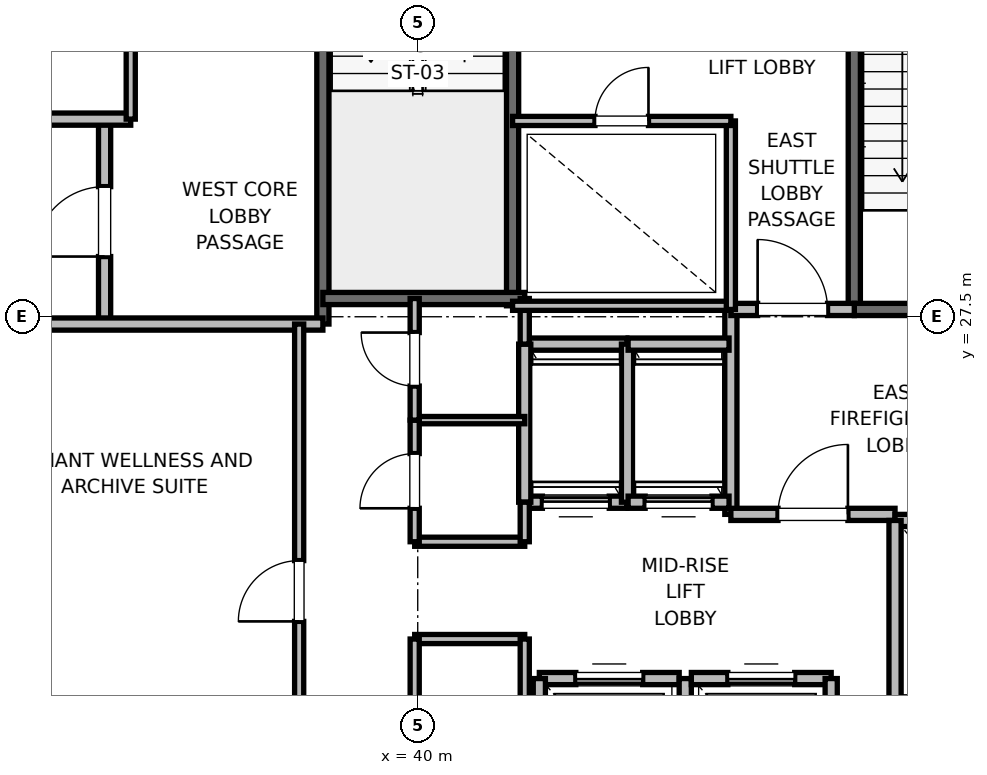
"""IFC4 building model, lengths in metres.
Left out: names, types, materials, properties, quantities, classifications, styles, units other than length and angle.
Written with IfcOpenShell. Run it as: python <this file> out.ifc"""

import sys

from ifc_helpers import new_model, si_unit, direction, frame, frame_2d, origin, place, context, subcontext, project, spatial, rectangle, extrude, element, fill, save


model = new_model("IFC4")
c1 = context("Model", 3, precision=1e-05, world=origin(), true_north=direction((0.0, 1.0)))
c2 = subcontext(c1, "Body", "Model", "MODEL_VIEW")
j1 = project(units=[si_unit("LENGTHUNIT", "METRE"), si_unit("PLANEANGLEUNIT", "RADIAN")], contexts=[c1])
p1 = place(None, origin())
s1 = spatial("IfcSite", under=j1, at=p1, CompositionType="ELEMENT")
p2 = place(p1, origin())
s2 = spatial("IfcBuilding", under=s1, at=p2, CompositionType="ELEMENT")
p3 = place(p2, frame((0.0, 0.0, 164.4)))
s3 = spatial("IfcBuildingStorey", under=s2, at=p3, CompositionType="ELEMENT", Elevation=164.4)
p4 = place(p3, frame((47.18, 27.62, 0.0), z_axis=(0.0, 0.0, 1.0), x_axis=(0.0, 1.0, 0.0)))
e1 = element("IfcWall", 1, at=p4, inside=s3, PredefinedType="SOLIDWALL", context=c2, shape_type="SweptSolid", body=[
    extrude(rectangle(XDim=8.18, YDim=0.2, at=frame_2d((4.09, 0.0))), origin(), (0.0, 0.0, 1.0), 3.775),
])
p5 = place(p3, frame((47.18, 27.62, 0.0), z_axis=(0.0, 0.0, 1.0), x_axis=(1.0, 0.0, 0.0)))
e2 = element("IfcWall", 2, at=p5, inside=s3, PredefinedType="SOLIDWALL", context=c2, shape_type="SweptSolid", body=[
    extrude(rectangle(XDim=3.12, YDim=0.2, at=frame_2d((1.56, 0.0))), origin(), (0.0, 0.0, 1.0), 3.775),
])
p6 = place(p5, frame((1.01, 0.0, 0.0)))
e3 = element("IfcOpeningElement", 3, at=p6, cuts=e2, PredefinedType="OPENING", context=c2, shape_type="SweptSolid", body=[
    extrude(rectangle(XDim=1.1, YDim=2.15, at=frame_2d((0.55, 1.075))), frame((0.0, 0.1, 0.0), z_axis=(0.0, -1.0, 0.0), x_axis=(1.0, 0.0, 0.0)), (0.0, 0.0, 1.0), 0.2),
])
p7 = place(p3, frame((38.44, 27.38, 0.0), z_axis=(0.0, 0.0, 1.0), x_axis=(0.0, 1.0, 0.0)))
e4 = element("IfcWall", 4, at=p7, inside=s3, PredefinedType="SOLIDWALL", context=c2, shape_type="SweptSolid", body=[
    extrude(rectangle(XDim=8.87, YDim=0.2, at=frame_2d((4.435, 0.0))), origin(), (0.0, 0.0, 1.0), 3.775),
])
p8 = place(p3, frame((41.56, 27.68, 0.0), z_axis=(0.0, 0.0, 1.0), x_axis=(0.0, 1.0, 0.0)))
e5 = element("IfcWall", 5, at=p8, inside=s3, PredefinedType="SOLIDWALL", context=c2, shape_type="SweptSolid", body=[
    extrude(rectangle(XDim=8.57, YDim=0.2, at=frame_2d((4.285, 0.0))), origin(), (0.0, 0.0, 1.0), 3.775),
])
p9 = place(p3, frame((38.44, 27.8, 0.0), z_axis=(0.0, 0.0, 1.0), x_axis=(1.0, 0.0, 0.0)))
e6 = element("IfcWall", 6, at=p9, inside=s3, PredefinedType="SOLIDWALL", context=c2, shape_type="SweptSolid", body=[
    extrude(rectangle(XDim=3.32, YDim=0.2, at=frame_2d((1.66, 0.0))), origin(), (0.0, 0.0, 1.0), 3.775),
])
p10 = place(p3, frame((34.85, 27.38, 0.0), z_axis=(0.0, 0.0, 1.0), x_axis=(0.0, 1.0, 0.0)))
e7 = element("IfcWall", 7, at=p10, inside=s3, PredefinedType="PARTITIONING", context=c2, shape_type="SweptSolid", body=[
    extrude(rectangle(XDim=3.37, YDim=0.2, at=frame_2d((1.685, 0.0))), origin(), (0.0, 0.0, 1.0), 3.775),
])
p11 = place(p10, frame((1.11, 0.0, 0.0)))
e8 = element("IfcOpeningElement", 8, at=p11, cuts=e7, PredefinedType="OPENING", context=c2, shape_type="SweptSolid", body=[
    extrude(rectangle(XDim=1.15, YDim=2.2, at=frame_2d((0.575, 1.1))), frame((0.0, 0.1, 0.0), z_axis=(0.0, -1.0, 0.0), x_axis=(1.0, 0.0, 0.0)), (0.0, 0.0, 1.0), 0.2),
])
p12 = place(p3, frame((32.82, 27.38, 0.0), z_axis=(0.0, 0.0, 1.0), x_axis=(1.0, 0.0, 0.0)))
e9 = element("IfcWall", 9, at=p12, inside=s3, PredefinedType="PARTITIONING", context=c2, shape_type="SweptSolid", body=[
    extrude(rectangle(XDim=5.62, YDim=0.2, at=frame_2d((2.81, 0.0))), origin(), (0.0, 0.0, 1.0), 3.775),
])
p13 = place(p3, frame((32.15, 30.75, 0.0), z_axis=(0.0, 0.0, 1.0), x_axis=(1.0, 0.0, 0.0)))
e10 = element("IfcWall", 10, at=p13, inside=s3, PredefinedType="PARTITIONING", context=c2, shape_type="SweptSolid", body=[
    extrude(rectangle(XDim=3.13, YDim=0.2, at=frame_2d((1.565, 0.0))), origin(), (0.0, 0.0, 1.0), 3.775),
])
p14 = place(p3, frame((45.15, 24.25, 0.0), z_axis=(0.0, 0.0, 1.0), x_axis=(0.0, 1.0, 0.0)))
e11 = element("IfcWall", 11, at=p14, inside=s3, PredefinedType="PARTITIONING", context=c2, shape_type="SweptSolid", body=[
    extrude(rectangle(XDim=3.37, YDim=0.2, at=frame_2d((1.685, 0.0))), origin(), (0.0, 0.0, 1.0), 3.775),
])
p15 = place(p3, frame((45.15, 24.25, 0.0), z_axis=(0.0, 0.0, 1.0), x_axis=(1.0, 0.0, 0.0)))
e12 = element("IfcWall", 12, at=p15, inside=s3, PredefinedType="PARTITIONING", context=c2, shape_type="SweptSolid", body=[
    extrude(rectangle(XDim=2.7, YDim=0.2, at=frame_2d((1.35, 0.0))), origin(), (0.0, 0.0, 1.0), 3.775),
])
p16 = place(p15, frame((0.775, 0.0, 0.0)))
e13 = element("IfcOpeningElement", 13, at=p16, cuts=e12, PredefinedType="OPENING", context=c2, shape_type="SweptSolid", body=[
    extrude(rectangle(XDim=1.15, YDim=2.2, at=frame_2d((0.575, 1.1))), frame((0.0, 0.1, 0.0), z_axis=(0.0, -1.0, 0.0), x_axis=(1.0, 0.0, 0.0)), (0.0, 0.0, 1.0), 0.2),
])
p17 = place(p3, frame((45.15, 27.62, 0.0), z_axis=(0.0, 0.0, 1.0), x_axis=(1.0, 0.0, 0.0)))
e14 = element("IfcWall", 14, at=p17, inside=s3, PredefinedType="PARTITIONING", context=c2, shape_type="SweptSolid", body=[
    extrude(rectangle(XDim=2.03, YDim=0.2, at=frame_2d((1.015, 0.0))), origin(), (0.0, 0.0, 1.0), 3.775),
])
p18 = place(p17, frame((0.44, 0.0, 0.0)))
e15 = element("IfcOpeningElement", 15, at=p18, cuts=e14, PredefinedType="OPENING", context=c2, shape_type="SweptSolid", body=[
    extrude(rectangle(XDim=1.15, YDim=2.2, at=frame_2d((0.575, 1.1))), frame((0.0, 0.1, 0.0), z_axis=(0.0, -1.0, 0.0), x_axis=(1.0, 0.0, 0.0)), (0.0, 0.0, 1.0), 0.2),
])
p19 = place(p3, frame((50.45, 24.15, 0.0), z_axis=(0.0, 0.0, 1.0), x_axis=(-1.0, 0.0, 0.0)))
e16 = element("IfcWall", 16, at=p19, inside=s3, PredefinedType="SOLIDWALL", context=c2, shape_type="SweptSolid", body=[
    extrude(rectangle(XDim=2.6, YDim=0.2, at=frame_2d((1.3, 0.0))), origin(), (0.0, 0.0, 1.0), 2.755),
])
p20 = place(p19, frame((0.75, 0.0, 0.0)))
e17 = element("IfcOpeningElement", 17, at=p20, cuts=e16, PredefinedType="OPENING", context=c2, shape_type="SweptSolid", body=[
    extrude(rectangle(XDim=1.1, YDim=2.2, at=frame_2d((0.55, 1.1))), frame((0.0, 0.1, 0.0), z_axis=(0.0, -1.0, 0.0), x_axis=(1.0, 0.0, 0.0)), (0.0, 0.0, 1.0), 0.2),
])
p21 = place(p3, frame((47.85, 24.15, 0.0), z_axis=(0.0, 0.0, 1.0), x_axis=(0.0, -1.0, 0.0)))
e18 = element("IfcWall", 18, at=p21, inside=s3, PredefinedType="SOLIDWALL", context=c2, shape_type="SweptSolid", body=[
    extrude(rectangle(XDim=3.0, YDim=0.2, at=frame_2d((1.5, 0.0))), origin(), (0.0, 0.0, 1.0), 3.775),
])
p22 = place(p3, frame((44.3, 21.55, 0.0), z_axis=(0.0, 0.0, 1.0), x_axis=(-1.0, 0.0, 0.0)))
e19 = element("IfcWall", 19, at=p22, inside=s3, PredefinedType="SOLIDWALL", context=c2, shape_type="SweptSolid", body=[
    extrude(rectangle(XDim=2.3, YDim=0.2, at=frame_2d((1.15, 0.0))), origin(), (0.0, 0.0, 1.0), 3.775),
])
p23 = place(p22, frame((0.6, 0.0, 0.0)))
e20 = element("IfcOpeningElement", 20, at=p23, cuts=e19, PredefinedType="OPENING", context=c2, shape_type="SweptSolid", body=[
    extrude(rectangle(XDim=1.1, YDim=2.2, at=frame_2d((0.55, 1.1))), frame((0.0, 0.1, 0.0), z_axis=(0.0, -1.0, 0.0), x_axis=(1.0, 0.0, 0.0)), (0.0, 0.0, 1.0), 0.2),
])
p24 = place(p3, frame((42.0, 21.55, 0.0), z_axis=(0.0, 0.0, 1.0), x_axis=(0.0, -1.0, 0.0)))
e21 = element("IfcWall", 21, at=p24, inside=s3, PredefinedType="SOLIDWALL", context=c2, shape_type="SweptSolid", body=[
    extrude(rectangle(XDim=2.6, YDim=0.2, at=frame_2d((1.3, 0.0))), origin(), (0.0, 0.0, 1.0), 2.755),
])
p25 = place(p3, frame((44.4, 18.95, 0.0), z_axis=(0.0, 0.0, 1.0), x_axis=(0.0, 1.0, 0.0)))
e22 = element("IfcWall", 22, at=p25, inside=s3, PredefinedType="SOLIDWALL", context=c2, shape_type="SweptSolid", body=[
    extrude(rectangle(XDim=2.6, YDim=0.2, at=frame_2d((1.3, 0.0))), origin(), (0.0, 0.0, 1.0), 3.775),
])
p26 = place(p3, frame((46.8, 21.55, 0.0), z_axis=(0.0, 0.0, 1.0), x_axis=(-1.0, 0.0, 0.0)))
e23 = element("IfcWall", 23, at=p26, inside=s3, PredefinedType="SOLIDWALL", context=c2, shape_type="SweptSolid", body=[
    extrude(rectangle(XDim=2.3, YDim=0.2, at=frame_2d((1.15, 0.0))), origin(), (0.0, 0.0, 1.0), 3.775),
])
p27 = place(p26, frame((0.6, 0.0, 0.0)))
e24 = element("IfcOpeningElement", 24, at=p27, cuts=e23, PredefinedType="OPENING", context=c2, shape_type="SweptSolid", body=[
    extrude(rectangle(XDim=1.1, YDim=2.2, at=frame_2d((0.55, 1.1))), frame((0.0, 0.1, 0.0), z_axis=(0.0, -1.0, 0.0), x_axis=(1.0, 0.0, 0.0)), (0.0, 0.0, 1.0), 0.2),
])
p28 = place(p3, frame((46.8, 18.95, 0.0), z_axis=(0.0, 0.0, 1.0), x_axis=(0.0, 1.0, 0.0)))
e25 = element("IfcWall", 25, at=p28, inside=s3, PredefinedType="SOLIDWALL", context=c2, shape_type="SweptSolid", body=[
    extrude(rectangle(XDim=2.6, YDim=0.2, at=frame_2d((1.3, 0.0))), origin(), (0.0, 0.0, 1.0), 3.775),
])
p29 = place(p3, frame((41.76, 24.45, 0.0), z_axis=(0.0, 0.0, 1.0), x_axis=(1.0, 0.0, 0.0)))
e26 = element("IfcWall", 26, at=p29, inside=s3, PredefinedType="SOLIDWALL", context=c2, shape_type="SweptSolid", body=[
    extrude(rectangle(XDim=1.68, YDim=0.2, at=frame_2d((0.84, 0.0))), origin(), (0.0, 0.0, 1.0), 3.775),
])
p30 = place(p29, frame((0.29, 0.0, 0.0)))
e27 = element("IfcOpeningElement", 27, at=p30, cuts=e26, PredefinedType="OPENING", context=c2, shape_type="SweptSolid", body=[
    extrude(rectangle(XDim=1.1, YDim=2.2, at=frame_2d((0.55, 1.1))), frame((0.0, 0.1, 0.0), z_axis=(0.0, -1.0, 0.0), x_axis=(1.0, 0.0, 0.0)), (0.0, 0.0, 1.0), 0.2),
])
p31 = place(p3, frame((43.44, 27.05, 0.0), z_axis=(0.0, 0.0, 1.0), x_axis=(-1.0, 0.0, 0.0)))
e28 = element("IfcWall", 28, at=p31, inside=s3, PredefinedType="SOLIDWALL", context=c2, shape_type="SweptSolid", body=[
    extrude(rectangle(XDim=1.68, YDim=0.2, at=frame_2d((0.84, 0.0))), origin(), (0.0, 0.0, 1.0), 3.775),
])
for number, where, z_axis, x_axis in (
    (29, (41.76, 27.05, 0.0), (0.0, 0.0, 1.0), (0.0, -1.0, 0.0)),
    (30, (43.45, 24.45, 0.0), (0.0, 0.0, 1.0), (0.0, 1.0, 0.0)),
):
    element("IfcWall", number, at=place(p3, frame(where, z_axis=z_axis, x_axis=x_axis)), inside=s3, PredefinedType="SOLIDWALL", context=c2, shape_type="SweptSolid", body=[
        extrude(rectangle(XDim=2.6, YDim=0.2, at=frame_2d((1.3, 0.0))), origin(), (0.0, 0.0, 1.0), 3.775),
    ])
p32 = place(p3, frame((43.46, 24.45, 0.0), z_axis=(0.0, 0.0, 1.0), x_axis=(1.0, 0.0, 0.0)))
e31 = element("IfcWall", 31, at=p32, inside=s3, PredefinedType="SOLIDWALL", context=c2, shape_type="SweptSolid", body=[
    extrude(rectangle(XDim=1.66, YDim=0.2, at=frame_2d((0.83, 0.0))), origin(), (0.0, 0.0, 1.0), 3.775),
])
p33 = place(p32, frame((0.28, 0.0, 0.0)))
e32 = element("IfcOpeningElement", 32, at=p33, cuts=e31, PredefinedType="OPENING", context=c2, shape_type="SweptSolid", body=[
    extrude(rectangle(XDim=1.1, YDim=2.2, at=frame_2d((0.55, 1.1))), frame((0.0, 0.1, 0.0), z_axis=(0.0, -1.0, 0.0), x_axis=(1.0, 0.0, 0.0)), (0.0, 0.0, 1.0), 0.2),
])
p34 = place(p3, frame((45.12, 27.05, 0.0), z_axis=(0.0, 0.0, 1.0), x_axis=(-1.0, 0.0, 0.0)))
e33 = element("IfcWall", 33, at=p34, inside=s3, PredefinedType="SOLIDWALL", context=c2, shape_type="SweptSolid", body=[
    extrude(rectangle(XDim=1.66, YDim=0.2, at=frame_2d((0.83, 0.0))), origin(), (0.0, 0.0, 1.0), 3.775),
])
for number, where, z_axis, x_axis in (
    (34, (39.95, 22.2, 0.0), (0.0, 0.0, 1.0), (1.0, 0.0, 0.0)),
    (35, (39.95, 23.8, 0.0), (0.0, 0.0, 1.0), (1.0, 0.0, 0.0)),
):
    element("IfcWall", number, at=place(p3, frame(where, z_axis=z_axis, x_axis=x_axis)), inside=s3, PredefinedType="PARTITIONING", context=c2, shape_type="SweptSolid", body=[
        extrude(rectangle(XDim=1.81, YDim=0.15, at=frame_2d((0.905, 0.0))), origin(), (0.0, 0.0, 1.0), 2.85),
    ])
p35 = place(p3, frame((39.95, 25.8, 0.0), z_axis=(0.0, 0.0, 1.0), x_axis=(1.0, 0.0, 0.0)))
e36 = element("IfcWall", 36, at=p35, inside=s3, PredefinedType="PARTITIONING", context=c2, shape_type="SweptSolid", body=[
    extrude(rectangle(XDim=1.81, YDim=0.12, at=frame_2d((0.905, 0.0))), origin(), (0.0, 0.0, 1.0), 2.85),
])
p36 = place(p3, frame((41.76, 18.6, 0.0), z_axis=(0.0, 0.0, 1.0), x_axis=(0.0, 1.0, 0.0)))
e37 = element("IfcWall", 37, at=p36, inside=s3, PredefinedType="PARTITIONING", context=c2, shape_type="SweptSolid", body=[
    extrude(rectangle(XDim=3.6, YDim=0.15, at=frame_2d((1.8, 0.0))), origin(), (0.0, 0.0, 1.0), 2.755),
])
p37 = place(p3, frame((41.76, 23.8, 0.0), z_axis=(0.0, 0.0, 1.0), x_axis=(0.0, 1.0, 0.0)))
e38 = element("IfcWall", 38, at=p37, inside=s3, PredefinedType="PARTITIONING", context=c2, shape_type="SweptSolid", body=[
    extrude(rectangle(XDim=0.65, YDim=0.15, at=frame_2d((0.325, 0.0))), origin(), (0.0, 0.0, 1.0), 2.85),
])
p38 = place(p3, frame((41.76, 27.05, 0.0), z_axis=(0.0, 0.0, 1.0), x_axis=(0.0, 1.0, 0.0)))
e39 = element("IfcWall", 39, at=p38, inside=s3, PredefinedType="PARTITIONING", context=c2, shape_type="SweptSolid", body=[
    extrude(rectangle(XDim=0.75, YDim=0.15, at=frame_2d((0.375, 0.0))), origin(), (0.0, 0.0, 1.0), 2.85),
])
p39 = place(p3, frame((39.95, 19.2, 0.0), z_axis=(0.0, 0.0, 1.0), x_axis=(0.0, 1.0, 0.0)))
e40 = element("IfcWall", 40, at=p39, inside=s3, PredefinedType="PARTITIONING", context=c2, shape_type="SweptSolid", body=[
    extrude(rectangle(XDim=3.0, YDim=0.15, at=frame_2d((1.5, 0.0))), origin(), (0.0, 0.0, 1.0), 2.85),
])
p40 = place(p39, frame((1.05, 0.0, 0.0)))
e41 = element("IfcOpeningElement", 41, at=p40, cuts=e40, PredefinedType="OPENING", context=c2, shape_type="SweptSolid", body=[
    extrude(rectangle(XDim=0.9, YDim=2.1, at=frame_2d((0.45, 1.05))), frame((0.0, 0.075, 0.0), z_axis=(0.0, -1.0, 0.0), x_axis=(1.0, 0.0, 0.0)), (0.0, 0.0, 1.0), 0.15),
])
p41 = place(p3, frame((39.95, 23.8, 0.0), z_axis=(0.0, 0.0, 1.0), x_axis=(0.0, 1.0, 0.0)))
e42 = element("IfcWall", 42, at=p41, inside=s3, PredefinedType="PARTITIONING", context=c2, shape_type="SweptSolid", body=[
    extrude(rectangle(XDim=2.0, YDim=0.15, at=frame_2d((1.0, 0.0))), origin(), (0.0, 0.0, 1.0), 2.85),
])
p42 = place(p41, frame((0.55, 0.0, 0.0)))
e43 = element("IfcOpeningElement", 43, at=p42, cuts=e42, PredefinedType="OPENING", context=c2, shape_type="SweptSolid", body=[
    extrude(rectangle(XDim=0.9, YDim=2.1, at=frame_2d((0.45, 1.05))), frame((0.0, 0.075, 0.0), z_axis=(0.0, -1.0, 0.0), x_axis=(1.0, 0.0, 0.0)), (0.0, 0.0, 1.0), 0.15),
])
p43 = place(p3, frame((39.95, 25.8, 0.0), z_axis=(0.0, 0.0, 1.0), x_axis=(0.0, 1.0, 0.0)))
e44 = element("IfcWall", 44, at=p43, inside=s3, PredefinedType="PARTITIONING", context=c2, shape_type="SweptSolid", body=[
    extrude(rectangle(XDim=2.0, YDim=0.15, at=frame_2d((1.0, 0.0))), origin(), (0.0, 0.0, 1.0), 2.85),
])
p44 = place(p43, frame((0.56, 0.0, 0.0)))
e45 = element("IfcOpeningElement", 45, at=p44, cuts=e44, PredefinedType="OPENING", context=c2, shape_type="SweptSolid", body=[
    extrude(rectangle(XDim=0.88, YDim=2.1, at=frame_2d((0.44, 1.05))), frame((0.0, 0.075, 0.0), z_axis=(0.0, -1.0, 0.0), x_axis=(1.0, 0.0, 0.0)), (0.0, 0.0, 1.0), 0.15),
])
p45 = place(p3, frame((35.28, 30.75, 0.0), z_axis=(0.0, 0.0, 1.0), x_axis=(0.0, 1.0, 0.0)))
e46 = element("IfcWall", 46, at=p45, inside=s3, PredefinedType="PARTITIONING", context=c2, shape_type="SweptSolid", body=[
    extrude(rectangle(XDim=3.2, YDim=0.15, at=frame_2d((1.6, 0.0))), origin(), (0.0, 0.0, 1.0), 2.85),
])
p46 = place(p45, frame((1.15, 0.0, 0.0)))
e47 = element("IfcOpeningElement", 47, at=p46, cuts=e46, PredefinedType="OPENING", context=c2, shape_type="SweptSolid", body=[
    extrude(rectangle(XDim=0.9, YDim=2.1, at=frame_2d((0.45, 1.05))), frame((0.0, 0.075, 0.0), z_axis=(0.0, -1.0, 0.0), x_axis=(1.0, 0.0, 0.0)), (0.0, 0.0, 1.0), 0.15),
])
p47 = place(p3, frame((38.05, 18.6, 0.0), z_axis=(0.0, 0.0, 1.0), x_axis=(0.0, 1.0, 0.0)))
e48 = element("IfcWall", 48, at=p47, inside=s3, PredefinedType="PARTITIONING", context=c2, shape_type="SweptSolid", body=[
    extrude(rectangle(XDim=8.78, YDim=0.15, at=frame_2d((4.39, 0.0))), origin(), (0.0, 0.0, 1.0), 2.755),
])
p48 = place(p47, frame((3.89, 0.0, 0.0)))
e49 = element("IfcOpeningElement", 49, at=p48, cuts=e48, PredefinedType="OPENING", context=c2, shape_type="SweptSolid", body=[
    extrude(rectangle(XDim=1.0, YDim=2.15, at=frame_2d((0.5, 1.075))), frame((0.0, 0.075, 0.0), z_axis=(0.0, -1.0, 0.0), x_axis=(1.0, 0.0, 0.0)), (0.0, 0.0, 1.0), 0.15),
])
p49 = place(p3, frame((41.56, 27.68, 0.0), z_axis=(0.0, 0.0, 1.0), x_axis=(1.0, 0.0, 0.0)))
e50 = element("IfcWall", 50, at=p49, inside=s3, PredefinedType="PARTITIONING", context=c2, shape_type="SweptSolid", body=[
    extrude(rectangle(XDim=3.59, YDim=0.15, at=frame_2d((1.795, 0.0))), origin(), (0.0, 0.0, 1.0), 2.85),
])
p50 = place(p3, frame((45.15, 27.62, 0.0), z_axis=(0.0, 0.0, 1.0), x_axis=(0.0, 1.0, 0.0)))
e51 = element("IfcWall", 51, at=p50, inside=s3, PredefinedType="PARTITIONING", context=c2, shape_type="SweptSolid", body=[
    extrude(rectangle(XDim=3.1, YDim=0.15, at=frame_2d((1.55, 0.0))), origin(), (0.0, 0.0, 1.0), 2.85),
])
p51 = place(p3, frame((41.56, 30.72, 0.0), z_axis=(0.0, 0.0, 1.0), x_axis=(1.0, 0.0, 0.0)))
e52 = element("IfcWall", 52, at=p51, inside=s3, PredefinedType="PARTITIONING", context=c2, shape_type="SweptSolid", body=[
    extrude(rectangle(XDim=3.59, YDim=0.15, at=frame_2d((1.795, 0.0))), origin(), (0.0, 0.0, 1.0), 2.85),
])
p52 = place(p51, frame((1.355, 0.0, 0.0)))
e53 = element("IfcOpeningElement", 53, at=p52, cuts=e52, PredefinedType="OPENING", context=c2, shape_type="SweptSolid", body=[
    extrude(rectangle(XDim=0.88, YDim=2.1, at=frame_2d((0.44, 1.05))), frame((0.0, 0.075, 0.0), z_axis=(0.0, -1.0, 0.0), x_axis=(1.0, 0.0, 0.0)), (0.0, 0.0, 1.0), 0.15),
])
p53 = place(p11, origin())
e54 = element("IfcDoor", 54, at=p53, inside=s3, OperationType="SINGLE_SWING_LEFT", PredefinedType="DOOR", context=c2, shape_type="SweptSolid", body=[
    extrude(rectangle(XDim=1.15, YDim=2.2, at=frame_2d((0.575, 1.1))), frame((0.0, 0.025, 0.0), z_axis=(0.0, -1.0, 0.0), x_axis=(1.0, 0.0, 0.0)), (0.0, 0.0, 1.0), 0.05),
])
fill(e8, e54)
p54 = place(p16, origin())
e55 = element("IfcDoor", 55, at=p54, inside=s3, OperationType="SINGLE_SWING_RIGHT", PredefinedType="DOOR", context=c2, shape_type="SweptSolid", body=[
    extrude(rectangle(XDim=1.15, YDim=2.2, at=frame_2d((0.575, 1.1))), frame((0.0, 0.025, 0.0), z_axis=(0.0, -1.0, 0.0), x_axis=(1.0, 0.0, 0.0)), (0.0, 0.0, 1.0), 0.05),
])
fill(e13, e55)
p55 = place(p18, origin())
e56 = element("IfcDoor", 56, at=p55, inside=s3, OperationType="SINGLE_SWING_LEFT", PredefinedType="DOOR", context=c2, shape_type="SweptSolid", body=[
    extrude(rectangle(XDim=1.15, YDim=2.2, at=frame_2d((0.575, 1.1))), frame((0.0, 0.025, 0.0), z_axis=(0.0, -1.0, 0.0), x_axis=(1.0, 0.0, 0.0)), (0.0, 0.0, 1.0), 0.05),
])
fill(e15, e56)
p56 = place(p23, origin())
e57 = element("IfcDoor", 57, at=p56, inside=s3, OperationType="SLIDING_TO_RIGHT", PredefinedType="DOOR", context=c2, shape_type="SweptSolid", body=[
    extrude(rectangle(XDim=1.1, YDim=2.2, at=frame_2d((0.55, 1.1))), frame((0.0, 0.025, 0.0), z_axis=(0.0, -1.0, 0.0), x_axis=(1.0, 0.0, 0.0)), (0.0, 0.0, 1.0), 0.05),
])
fill(e20, e57)
p57 = place(p27, origin())
e58 = element("IfcDoor", 58, at=p57, inside=s3, OperationType="SLIDING_TO_RIGHT", PredefinedType="DOOR", context=c2, shape_type="SweptSolid", body=[
    extrude(rectangle(XDim=1.1, YDim=2.2, at=frame_2d((0.55, 1.1))), frame((0.0, 0.025, 0.0), z_axis=(0.0, -1.0, 0.0), x_axis=(1.0, 0.0, 0.0)), (0.0, 0.0, 1.0), 0.05),
])
fill(e24, e58)
p58 = place(p30, origin())
e59 = element("IfcDoor", 59, at=p58, inside=s3, OperationType="SLIDING_TO_RIGHT", PredefinedType="DOOR", context=c2, shape_type="SweptSolid", body=[
    extrude(rectangle(XDim=1.1, YDim=2.2, at=frame_2d((0.55, 1.1))), frame((0.0, 0.025, 0.0), z_axis=(0.0, -1.0, 0.0), x_axis=(1.0, 0.0, 0.0)), (0.0, 0.0, 1.0), 0.05),
])
fill(e27, e59)
p59 = place(p33, origin())
e60 = element("IfcDoor", 60, at=p59, inside=s3, OperationType="SLIDING_TO_RIGHT", PredefinedType="DOOR", context=c2, shape_type="SweptSolid", body=[
    extrude(rectangle(XDim=1.1, YDim=2.2, at=frame_2d((0.55, 1.1))), frame((0.0, 0.025, 0.0), z_axis=(0.0, -1.0, 0.0), x_axis=(1.0, 0.0, 0.0)), (0.0, 0.0, 1.0), 0.05),
])
fill(e32, e60)
p60 = place(p42, origin())
e61 = element("IfcDoor", 61, at=p60, inside=s3, OperationType="SINGLE_SWING_LEFT", PredefinedType="DOOR", context=c2, shape_type="SweptSolid", body=[
    extrude(rectangle(XDim=0.9, YDim=2.1, at=frame_2d((0.45, 1.05))), frame((0.0, 0.025, 0.0), z_axis=(0.0, -1.0, 0.0), x_axis=(1.0, 0.0, 0.0)), (0.0, 0.0, 1.0), 0.05),
])
fill(e43, e61)
p61 = place(p44, origin())
e62 = element("IfcDoor", 62, at=p61, inside=s3, OperationType="SINGLE_SWING_RIGHT", PredefinedType="DOOR", context=c2, shape_type="SweptSolid", body=[
    extrude(rectangle(XDim=0.88, YDim=2.1, at=frame_2d((0.44, 1.05))), frame((0.0, 0.025, 0.0), z_axis=(0.0, -1.0, 0.0), x_axis=(1.0, 0.0, 0.0)), (0.0, 0.0, 1.0), 0.05),
])
fill(e45, e62)
p62 = place(p48, origin())
e63 = element("IfcDoor", 63, at=p62, inside=s3, OperationType="SINGLE_SWING_LEFT", PredefinedType="DOOR", context=c2, shape_type="SweptSolid", body=[
    extrude(rectangle(XDim=1.0, YDim=2.15, at=frame_2d((0.5, 1.075))), frame((0.0, 0.025, 0.0), z_axis=(0.0, -1.0, 0.0), x_axis=(1.0, 0.0, 0.0)), (0.0, 0.0, 1.0), 0.05),
])
fill(e49, e63)
p63 = place(p52, origin())
e64 = element("IfcDoor", 64, at=p63, inside=s3, OperationType="SINGLE_SWING_RIGHT", PredefinedType="DOOR", context=c2, shape_type="SweptSolid", body=[
    extrude(rectangle(XDim=0.88, YDim=2.1, at=frame_2d((0.44, 1.05))), frame((0.0, 0.025, 0.0), z_axis=(0.0, -1.0, 0.0), x_axis=(1.0, 0.0, 0.0)), (0.0, 0.0, 1.0), 0.05),
])
fill(e53, e64)
save(model, sys.argv[1])
